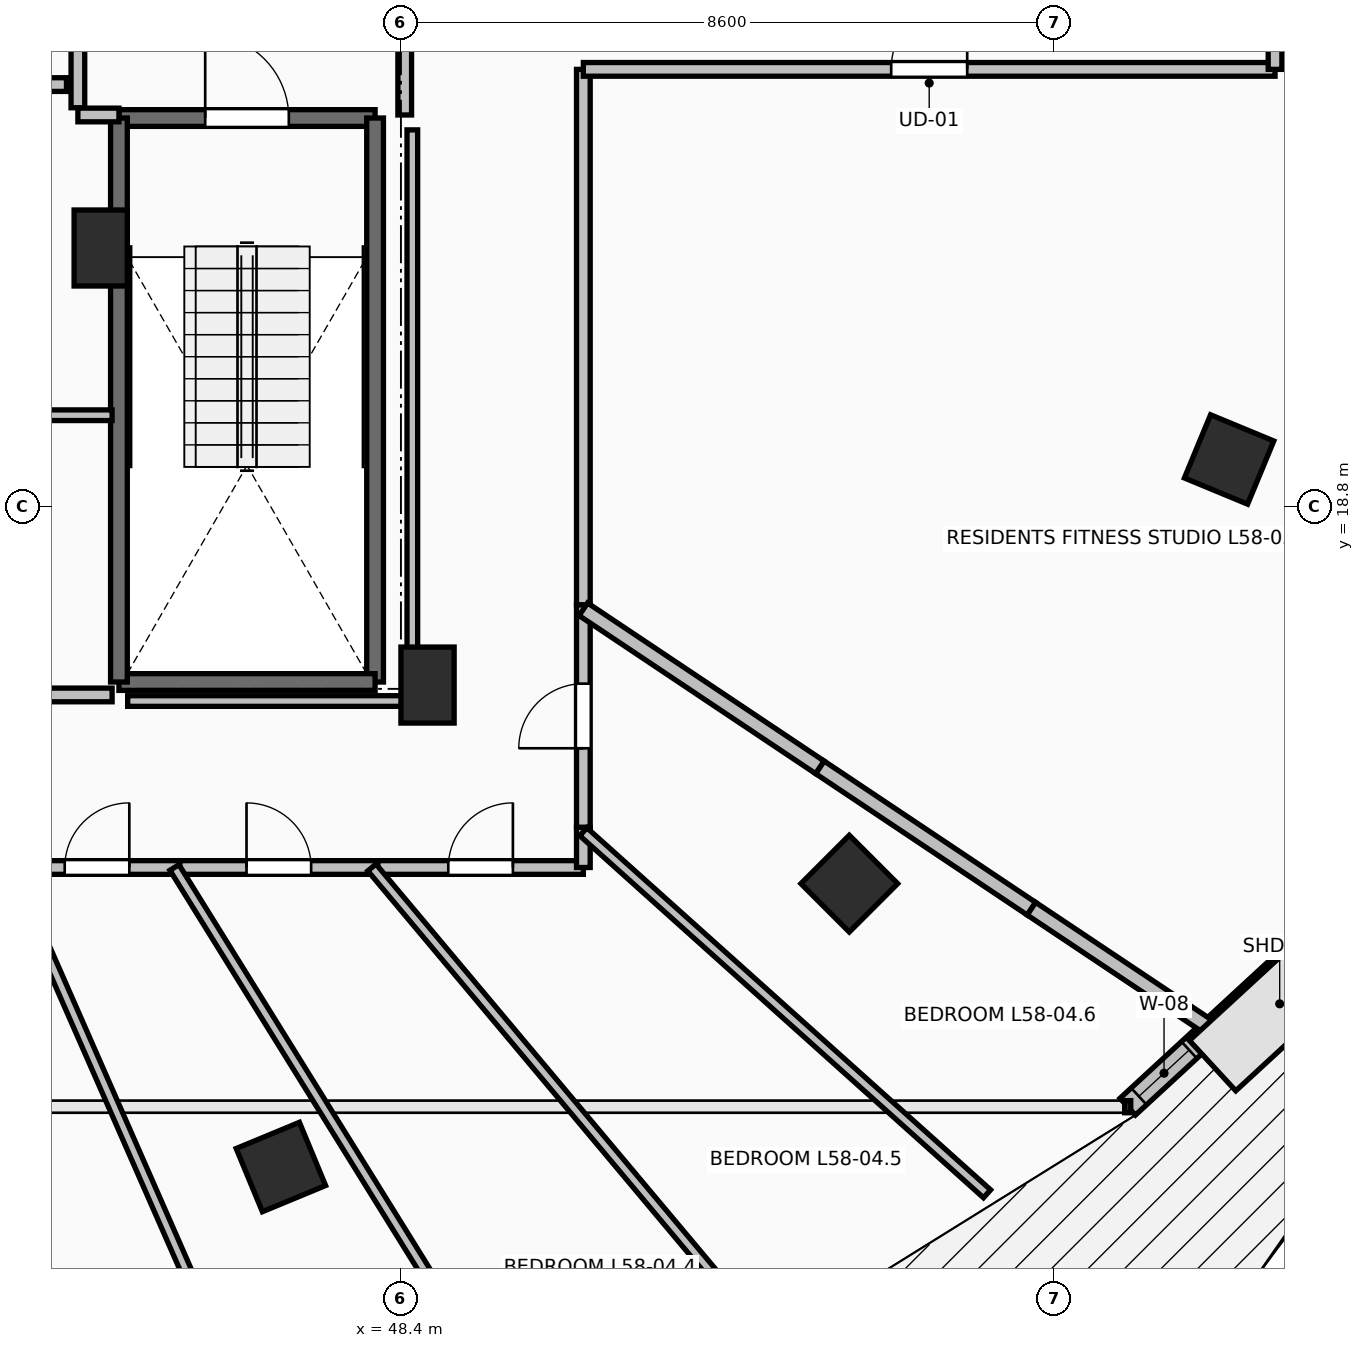
"""IFC4 building model, lengths in metres.
Left out: names, types, materials, properties, quantities, classifications, styles, units other than length and angle.
Written with IfcOpenShell. Run it as: python <this file> out.ifc"""

import sys

from ifc_helpers import new_model, si_unit, direction, frame, frame_2d, origin, origin_2d, place, context, subcontext, project, spatial, rectangle, extrude, element, fill, save


model = new_model("IFC4")
c1 = context("Model", 3, precision=1e-05, world=origin(), true_north=direction((0.0, 1.0)))
c2 = subcontext(c1, "Body", "Model", "MODEL_VIEW")
j1 = project(units=[si_unit("LENGTHUNIT", "METRE"), si_unit("PLANEANGLEUNIT", "RADIAN")], contexts=[c1])
p1 = place(None, origin())
s1 = spatial("IfcSite", under=j1, at=p1, CompositionType="ELEMENT")
p2 = place(p1, origin())
s2 = spatial("IfcBuilding", under=s1, at=p2, CompositionType="ELEMENT")
p3 = place(p2, frame((0.0, 0.0, 214.3)))
s3 = spatial("IfcBuildingStorey", under=s2, at=p3, CompositionType="ELEMENT", Elevation=214.3)
for number, where, z_axis, x_axis in (
    (1, (46.821, 10.109, 0.0), (0.0, 0.0, 1.0), (0.383, -0.924, 0.0)),
    (2, (54.299, 13.838, 0.0), (0.0, 0.0, 1.0), (0.707, -0.707, 0.0)),
    (3, (59.295, 19.418, 0.0), (0.0, 0.0, 1.0), (0.924, -0.383, 0.0)),
):
    element("IfcColumn", number, at=place(p3, frame(where, z_axis=z_axis, x_axis=x_axis)), inside=s3, PredefinedType="COLUMN", context=c2, shape_type="SweptSolid", body=[
        extrude(rectangle(XDim=0.9, YDim=0.9, at=origin_2d()), origin(), (0.0, 0.0, 1.0), 3.55),
    ])
for number, where, z_axis, x_axis in (
    (4, (48.75, 16.45, 0.0), (0.0, 0.0, 1.0), (1.0, 0.0, 0.0)),
    (5, (44.45, 22.2, 0.0), (0.0, 0.0, 1.0), (1.0, 0.0, 0.0)),
):
    element("IfcColumn", number, at=place(p3, frame(where, z_axis=z_axis, x_axis=x_axis)), inside=s3, PredefinedType="PILASTER", context=c2, shape_type="SweptSolid", body=[
        extrude(rectangle(XDim=0.7, YDim=1.0, at=origin_2d()), origin(), (0.0, 0.0, 1.0), 3.55),
    ])
p4 = place(p3, frame((57.962, 10.903, 0.0), z_axis=(0.0, 0.0, 1.0), x_axis=(0.735359993374, 0.677676678177, 0.0)))
e6 = element("IfcWall", 6, at=p4, inside=s3, PredefinedType="STANDARD", context=c2, shape_type="SweptSolid", body=[
    extrude(rectangle(XDim=4.774, YDim=0.3, at=frame_2d((2.387, 0.0))), origin(), (0.0, 0.0, 1.0), 3.29),
])
p5 = place(p4, frame((0.2, 0.0, 0.85)))
e7 = element("IfcOpeningElement", 7, at=p5, cuts=e6, PredefinedType="OPENING", context=c2, shape_type="SweptSolid", body=[
    extrude(rectangle(XDim=0.9, YDim=1.8, at=frame_2d((0.45, 0.9))), frame((0.0, 0.165, 0.0), z_axis=(0.0, -1.0, 0.0), x_axis=(1.0, 0.0, 0.0)), (0.0, 0.0, 1.0), 0.33),
])
p6 = place(p3, frame((44.69, 23.91, 0.0), z_axis=(0.0, 0.0, 1.0), x_axis=(1.0, 0.0, 0.0)))
e8 = element("IfcWall", 8, at=p6, inside=s3, PredefinedType="SOLIDWALL", context=c2, shape_type="SweptSolid", body=[
    extrude(rectangle(XDim=3.37, YDim=0.22, at=frame_2d((1.685, 0.0))), origin(), (0.0, 0.0, 1.0), 3.29),
])
p7 = place(p6, frame((1.135, 0.0, 0.0)))
e9 = element("IfcOpeningElement", 9, at=p7, cuts=e8, PredefinedType="OPENING", context=c2, shape_type="SweptSolid", body=[
    extrude(rectangle(XDim=1.1, YDim=2.15, at=frame_2d((0.55, 1.075))), frame((0.0, 0.125, 0.0), z_axis=(0.0, -1.0, 0.0), x_axis=(1.0, 0.0, 0.0)), (0.0, 0.0, 1.0), 0.25),
])
p8 = place(p3, frame((48.06, 23.91, 0.0), z_axis=(0.0, 0.0, 1.0), x_axis=(0.0, -1.0, 0.0)))
e10 = element("IfcWall", 10, at=p8, inside=s3, PredefinedType="SOLIDWALL", context=c2, shape_type="SweptSolid", body=[
    extrude(rectangle(XDim=7.42, YDim=0.22, at=frame_2d((3.71, 0.0))), origin(), (0.0, 0.0, 1.0), 3.29),
])
p9 = place(p3, frame((48.06, 16.49, 0.0), z_axis=(0.0, 0.0, 1.0), x_axis=(-1.0, 0.0, 0.0)))
e11 = element("IfcWall", 11, at=p9, inside=s3, PredefinedType="SOLIDWALL", context=c2, shape_type="SweptSolid", body=[
    extrude(rectangle(XDim=3.37, YDim=0.22, at=frame_2d((1.685, 0.0))), origin(), (0.0, 0.0, 1.0), 3.29),
])
p10 = place(p3, frame((44.69, 16.49, 0.0), z_axis=(0.0, 0.0, 1.0), x_axis=(0.0, 1.0, 0.0)))
e12 = element("IfcWall", 12, at=p10, inside=s3, PredefinedType="SOLIDWALL", context=c2, shape_type="SweptSolid", body=[
    extrude(rectangle(XDim=7.42, YDim=0.22, at=frame_2d((3.71, 0.0))), origin(), (0.0, 0.0, 1.0), 3.29),
])
p11 = place(p3, frame((44.15, 27.955, 0.0), z_axis=(0.0, 0.0, 1.0), x_axis=(0.0, -1.0, 0.0)))
e13 = element("IfcWall", 13, at=p11, inside=s3, PredefinedType="PARTITIONING", context=c2, shape_type="SweptSolid", body=[
    extrude(rectangle(XDim=3.91, YDim=0.18, at=frame_2d((1.955, 0.0))), origin(), (0.0, 0.0, 1.0), 3.29),
])
p12 = place(p11, frame((1.355, 0.0, 0.0)))
e14 = element("IfcOpeningElement", 14, at=p12, cuts=e13, PredefinedType="OPENING", context=c2, shape_type="SweptSolid", body=[
    extrude(rectangle(XDim=1.2, YDim=2.15, at=frame_2d((0.6, 1.075))), frame((0.0, 0.105, 0.0), z_axis=(0.0, -1.0, 0.0), x_axis=(1.0, 0.0, 0.0)), (0.0, 0.0, 1.0), 0.21),
])
p13 = place(p3, frame((44.15, 23.95, 0.0), z_axis=(0.0, 0.0, 1.0), x_axis=(1.0, 0.0, 0.0)))
e15 = element("IfcWall", 15, at=p13, inside=s3, PredefinedType="PARTITIONING", context=c2, shape_type="SweptSolid", body=[
    extrude(rectangle(XDim=0.54, YDim=0.18, at=frame_2d((0.27, 0.0))), origin(), (0.0, 0.0, 1.0), 3.29),
])
p14 = place(p3, frame((48.45, 23.95, 0.0), z_axis=(0.0, 0.0, 1.0), x_axis=(0.0, 1.0, 0.0)))
e16 = element("IfcWall", 16, at=p14, inside=s3, PredefinedType="PARTITIONING", context=c2, shape_type="SweptSolid", body=[
    extrude(rectangle(XDim=4.05, YDim=0.18, at=frame_2d((2.025, 0.0))), origin(), (0.0, 0.0, 1.0), 3.29),
])
p15 = place(p14, frame((1.425, 0.0, 0.0)))
e17 = element("IfcOpeningElement", 17, at=p15, cuts=e16, PredefinedType="OPENING", context=c2, shape_type="SweptSolid", body=[
    extrude(rectangle(XDim=1.2, YDim=2.15, at=frame_2d((0.6, 1.075))), frame((0.0, 0.105, 0.0), z_axis=(0.0, -1.0, 0.0), x_axis=(1.0, 0.0, 0.0)), (0.0, 0.0, 1.0), 0.21),
])
p16 = place(p3, frame((41.555, 24.35, 0.0), z_axis=(0.0, 0.0, 1.0), x_axis=(1.0, 0.0, 0.0)))
e18 = element("IfcWall", 18, at=p16, inside=s3, PredefinedType="PARTITIONING", context=c2, shape_type="SweptSolid", body=[
    extrude(rectangle(XDim=2.445, YDim=0.18, at=frame_2d((1.223, 0.0))), origin(), (0.0, 0.0, 1.0), 3.29),
])
p17 = place(p16, frame((0.722, 0.0, 0.0)))
e19 = element("IfcOpeningElement", 19, at=p17, cuts=e18, PredefinedType="OPENING", context=c2, shape_type="SweptSolid", body=[
    extrude(rectangle(XDim=1.0, YDim=2.15, at=frame_2d((0.5, 1.075))), frame((0.0, 0.105, 0.0), z_axis=(0.0, -1.0, 0.0), x_axis=(1.0, 0.0, 0.0)), (0.0, 0.0, 1.0), 0.21),
])
p18 = place(p3, frame((44.6, 20.0, 0.0), z_axis=(0.0, 0.0, 1.0), x_axis=(-1.0, 0.0, 0.0)))
e20 = element("IfcWall", 20, at=p18, inside=s3, PredefinedType="PARTITIONING", context=c2, shape_type="SweptSolid", body=[
    extrude(rectangle(XDim=3.2, YDim=0.14, at=frame_2d((1.6, 0.0))), origin(), (0.0, 0.0, 1.0), 3.29),
])
p19 = place(p3, frame((41.4, 16.32, 0.0), z_axis=(0.0, 0.0, 1.0), x_axis=(1.0, 0.0, 0.0)))
e21 = element("IfcWall", 21, at=p19, inside=s3, PredefinedType="PARTITIONING", context=c2, shape_type="SweptSolid", body=[
    extrude(rectangle(XDim=3.2, YDim=0.18, at=frame_2d((1.6, 0.0))), origin(), (0.0, 0.0, 1.0), 3.29),
])
p20 = place(p19, frame((1.2, 0.0, 0.0)))
e22 = element("IfcOpeningElement", 22, at=p20, cuts=e21, PredefinedType="OPENING", context=c2, shape_type="SweptSolid", body=[
    extrude(rectangle(XDim=0.8, YDim=2.05, at=frame_2d((0.4, 1.025))), frame((0.0, 0.105, 0.0), z_axis=(0.0, -1.0, 0.0), x_axis=(1.0, 0.0, 0.0)), (0.0, 0.0, 1.0), 0.21),
])
p21 = place(p3, frame((43.312, 14.05, 0.0), z_axis=(0.0, 0.0, 1.0), x_axis=(1.0, 0.0, 0.0)))
e23 = element("IfcWall", 23, at=p21, inside=s3, PredefinedType="PARTITIONING", context=c2, shape_type="SweptSolid", body=[
    extrude(rectangle(XDim=2.179, YDim=0.18, at=frame_2d((1.089, 0.0))), origin(), (0.0, 0.0, 1.0), 2.482),
])
p22 = place(p21, frame((0.665, 0.0, 0.0)))
e24 = element("IfcOpeningElement", 24, at=p22, cuts=e23, PredefinedType="OPENING", context=c2, shape_type="SweptSolid", body=[
    extrude(rectangle(XDim=0.85, YDim=2.1, at=frame_2d((0.425, 1.05))), frame((0.0, 0.105, 0.0), z_axis=(0.0, -1.0, 0.0), x_axis=(1.0, 0.0, 0.0)), (0.0, 0.0, 1.0), 0.21),
])
p23 = place(p3, frame((45.491, 14.05, 0.0), z_axis=(0.0, 0.0, 1.0), x_axis=(1.0, 0.0, 0.0)))
e25 = element("IfcWall", 25, at=p23, inside=s3, PredefinedType="PARTITIONING", context=c2, shape_type="SweptSolid", body=[
    extrude(rectangle(XDim=2.605, YDim=0.18, at=frame_2d((1.302, 0.0))), origin(), (0.0, 0.0, 1.0), 2.482),
])
p24 = place(p23, frame((0.877, 0.0, 0.0)))
e26 = element("IfcOpeningElement", 26, at=p24, cuts=e25, PredefinedType="OPENING", context=c2, shape_type="SweptSolid", body=[
    extrude(rectangle(XDim=0.85, YDim=2.1, at=frame_2d((0.425, 1.05))), frame((0.0, 0.105, 0.0), z_axis=(0.0, -1.0, 0.0), x_axis=(1.0, 0.0, 0.0)), (0.0, 0.0, 1.0), 0.21),
])
p25 = place(p3, frame((48.096, 14.05, 0.0), z_axis=(0.0, 0.0, 1.0), x_axis=(1.0, 0.0, 0.0)))
e27 = element("IfcWall", 27, at=p25, inside=s3, PredefinedType="PARTITIONING", context=c2, shape_type="SweptSolid", body=[
    extrude(rectangle(XDim=2.704, YDim=0.18, at=frame_2d((1.352, 0.0))), origin(), (0.0, 0.0, 1.0), 2.482),
])
p26 = place(p25, frame((0.927, 0.0, 0.0)))
e28 = element("IfcOpeningElement", 28, at=p26, cuts=e27, PredefinedType="OPENING", context=c2, shape_type="SweptSolid", body=[
    extrude(rectangle(XDim=0.85, YDim=2.1, at=frame_2d((0.425, 1.05))), frame((0.0, 0.105, 0.0), z_axis=(0.0, -1.0, 0.0), x_axis=(1.0, 0.0, 0.0)), (0.0, 0.0, 1.0), 0.21),
])
p27 = place(p3, frame((50.8, 14.05, 0.0), z_axis=(0.0, 0.0, 1.0), x_axis=(0.0, 1.0, 0.0)))
e29 = element("IfcWall", 29, at=p27, inside=s3, PredefinedType="PARTITIONING", context=c2, shape_type="SweptSolid", body=[
    extrude(rectangle(XDim=0.53, YDim=0.18, at=frame_2d((0.265, 0.0))), origin(), (0.0, 0.0, 1.0), 2.936),
])
p28 = place(p3, frame((50.8, 14.58, 0.0), z_axis=(0.0, 0.0, 1.0), x_axis=(0.0, 1.0, 0.0)))
e30 = element("IfcWall", 30, at=p28, inside=s3, PredefinedType="PARTITIONING", context=c2, shape_type="SweptSolid", body=[
    extrude(rectangle(XDim=2.927, YDim=0.18, at=frame_2d((1.463, 0.0))), origin(), (0.0, 0.0, 1.0), 2.482),
])
p29 = place(p28, frame((1.039, 0.0, 0.0)))
e31 = element("IfcOpeningElement", 31, at=p29, cuts=e30, PredefinedType="OPENING", context=c2, shape_type="SweptSolid", body=[
    extrude(rectangle(XDim=0.85, YDim=2.1, at=frame_2d((0.425, 1.05))), frame((0.0, 0.105, 0.0), z_axis=(0.0, -1.0, 0.0), x_axis=(1.0, 0.0, 0.0)), (0.0, 0.0, 1.0), 0.21),
])
p30 = place(p3, frame((50.8, 17.507, 0.0), z_axis=(0.0, 0.0, 1.0), x_axis=(0.0, 1.0, 0.0)))
e32 = element("IfcWall", 32, at=p30, inside=s3, PredefinedType="PARTITIONING", context=c2, shape_type="SweptSolid", body=[
    extrude(rectangle(XDim=7.043, YDim=0.18, at=frame_2d((3.521, 0.0))), origin(), (0.0, 0.0, 1.0), 2.979),
])
p31 = place(p3, frame((50.8, 24.55, 0.0), z_axis=(0.0, 0.0, 1.0), x_axis=(1.0, 0.0, 0.0)))
e33 = element("IfcWall", 33, at=p31, inside=s3, PredefinedType="PARTITIONING", context=c2, shape_type="SweptSolid", body=[
    extrude(rectangle(XDim=9.1, YDim=0.18, at=frame_2d((4.55, 0.0))), origin(), (0.0, 0.0, 1.0), 2.482),
])
p32 = place(p31, frame((4.05, 0.0, 0.0)))
e34 = element("IfcOpeningElement", 34, at=p32, cuts=e33, PredefinedType="OPENING", context=c2, shape_type="SweptSolid", body=[
    extrude(rectangle(XDim=1.0, YDim=2.15, at=frame_2d((0.5, 1.075))), frame((0.0, 0.105, 0.0), z_axis=(0.0, -1.0, 0.0), x_axis=(1.0, 0.0, 0.0)), (0.0, 0.0, 1.0), 0.21),
])
p33 = place(p3, frame((59.9, 24.55, 0.0), z_axis=(0.0, 0.0, 1.0), x_axis=(0.0, 1.0, 0.0)))
e35 = element("IfcWall", 35, at=p33, inside=s3, PredefinedType="PARTITIONING", context=c2, shape_type="SweptSolid", body=[
    extrude(rectangle(XDim=2.7, YDim=0.18, at=frame_2d((1.35, 0.0))), origin(), (0.0, 0.0, 1.0), 2.482),
])
p34 = place(p3, frame((43.812, 5.131, 0.0), z_axis=(0.0, 0.0, 1.0), x_axis=(-0.268310216589, 0.963332563383, 0.0)))
e36 = element("IfcWall", 36, at=p34, inside=s3, PredefinedType="PARTITIONING", context=c2, shape_type="SweptSolid", body=[
    extrude(rectangle(XDim=9.259, YDim=0.14, at=frame_2d((4.629, 0.0))), origin(), (0.0, 0.0, 1.0), 2.482),
])
p35 = place(p34, frame((4.204, 0.0, 0.0)))
e37 = element("IfcOpeningElement", 37, at=p35, cuts=e36, PredefinedType="OPENING", context=c2, shape_type="SweptSolid", body=[
    extrude(rectangle(XDim=0.85, YDim=2.1, at=frame_2d((0.425, 1.05))), frame((0.0, 0.085, 0.0), z_axis=(0.0, -1.0, 0.0), x_axis=(1.0, 0.0, 0.0)), (0.0, 0.0, 1.0), 0.17),
])
p36 = place(p3, frame((46.854, 5.829, 0.0), z_axis=(0.0, 0.0, 1.0), x_axis=(-0.401869944724, 0.915696755224, 0.0)))
e38 = element("IfcWall", 38, at=p36, inside=s3, PredefinedType="PARTITIONING", context=c2, shape_type="SweptSolid", body=[
    extrude(rectangle(XDim=8.978, YDim=0.14, at=frame_2d((4.489, 0.0))), origin(), (0.0, 0.0, 1.0), 2.482),
])
p37 = place(p3, frame((49.957, 6.743, 0.0), z_axis=(0.0, 0.0, 1.0), x_axis=(-0.527501342892, 0.849554196769, 0.0)))
e39 = element("IfcWall", 39, at=p37, inside=s3, PredefinedType="PARTITIONING", context=c2, shape_type="SweptSolid", body=[
    extrude(rectangle(XDim=8.601, YDim=0.14, at=frame_2d((4.301, 0.0))), origin(), (0.0, 0.0, 1.0), 2.482),
])
p38 = place(p3, frame((53.083, 8.009, 0.0), z_axis=(0.0, 0.0, 1.0), x_axis=(-0.642484403916, 0.766298760749, 0.0)))
e40 = element("IfcWall", 40, at=p38, inside=s3, PredefinedType="PARTITIONING", context=c2, shape_type="SweptSolid", body=[
    extrude(rectangle(XDim=7.883, YDim=0.14, at=frame_2d((3.942, 0.0))), origin(), (0.0, 0.0, 1.0), 2.482),
])
p39 = place(p3, frame((56.111, 9.757, 0.0), z_axis=(0.0, 0.0, 1.0), x_axis=(-0.744477346253, 0.667647722168, 0.0)))
e41 = element("IfcWall", 41, at=p39, inside=s3, PredefinedType="PARTITIONING", context=c2, shape_type="SweptSolid", body=[
    extrude(rectangle(XDim=7.134, YDim=0.14, at=frame_2d((3.567, 0.0))), origin(), (0.0, 0.0, 1.0), 2.824),
])
p40 = place(p3, frame((56.695, 13.508, 0.0), z_axis=(0.0, 0.0, 1.0), x_axis=(-0.831533913479, 0.55547398745, 0.0)))
e42 = element("IfcWall", 42, at=p40, inside=s3, PredefinedType="PARTITIONING", context=c2, shape_type="SweptSolid", body=[
    extrude(rectangle(XDim=3.348, YDim=0.2, at=frame_2d((1.674, 0.0))), origin(), (0.0, 0.0, 1.0), 2.824),
])
p41 = place(p3, frame((53.911, 15.368, 0.0), z_axis=(0.0, 0.0, 1.0), x_axis=(-0.83140728108, 0.55566350696, 0.0)))
e43 = element("IfcWall", 43, at=p41, inside=s3, PredefinedType="PARTITIONING", context=c2, shape_type="SweptSolid", body=[
    extrude(rectangle(XDim=3.742, YDim=0.2, at=frame_2d((1.871, 0.0))), origin(), (0.0, 0.0, 1.0), 2.936),
])
p42 = place(p3, frame((59.067, 11.924, 0.0), z_axis=(0.0, 0.0, 1.0), x_axis=(-0.831602270354, 0.555371644885, 0.0)))
e44 = element("IfcWall", 44, at=p42, inside=s3, PredefinedType="PARTITIONING", context=c2, shape_type="SweptSolid", body=[
    extrude(rectangle(XDim=2.852, YDim=0.2, at=frame_2d((1.426, 0.0))), origin(), (0.0, 0.0, 1.0), 3.29),
])
p43 = place(p3, frame((44.805, 16.24, 0.0), z_axis=(0.0, 0.0, 1.0), x_axis=(1.0, 0.0, 0.0)))
e45 = element("IfcWall", 45, at=p43, inside=s3, PredefinedType="PARTITIONING", context=c2, shape_type="SweptSolid", body=[
    extrude(rectangle(XDim=3.745, YDim=0.14, at=frame_2d((1.873, 0.0))), origin(), (0.0, 0.0, 1.0), 2.482),
])
p44 = place(p3, frame((48.55, 16.24, 0.0), z_axis=(0.0, 0.0, 1.0), x_axis=(0.0, 1.0, 0.0)))
e46 = element("IfcWall", 46, at=p44, inside=s3, PredefinedType="PARTITIONING", context=c2, shape_type="SweptSolid", body=[
    extrude(rectangle(XDim=7.514, YDim=0.14, at=frame_2d((3.757, 0.0))), origin(), (0.0, 0.0, 1.0), 2.482),
])
p45 = place(p5, origin())
e47 = element("IfcWindow", 47, at=p45, inside=s3, PartitioningType="SINGLE_PANEL", PredefinedType="WINDOW", context=c2, shape_type="SweptSolid", body=[
    extrude(rectangle(XDim=0.9, YDim=1.8, at=frame_2d((0.45, 0.9))), frame((0.0, 0.03, 0.0), z_axis=(0.0, -1.0, 0.0), x_axis=(1.0, 0.0, 0.0)), (0.0, 0.0, 1.0), 0.06),
])
fill(e7, e47)
p46 = place(p7, origin())
e48 = element("IfcDoor", 48, at=p46, inside=s3, OperationType="SINGLE_SWING_LEFT", PredefinedType="DOOR", context=c2, shape_type="SweptSolid", body=[
    extrude(rectangle(XDim=1.1, YDim=2.15, at=frame_2d((0.55, 1.075))), frame((0.0, 0.025, 0.0), z_axis=(0.0, -1.0, 0.0), x_axis=(1.0, 0.0, 0.0)), (0.0, 0.0, 1.0), 0.05),
])
fill(e9, e48)
p47 = place(p32, origin())
e49 = element("IfcDoor", 49, at=p47, inside=s3, OperationType="SINGLE_SWING_RIGHT", PredefinedType="DOOR", context=c2, shape_type="SweptSolid", body=[
    extrude(rectangle(XDim=1.0, YDim=2.15, at=frame_2d((0.5, 1.075))), frame((0.0, 0.025, 0.0), z_axis=(0.0, -1.0, 0.0), x_axis=(1.0, 0.0, 0.0)), (0.0, 0.0, 1.0), 0.05),
])
fill(e34, e49)
p48 = place(p22, origin())
e50 = element("IfcDoor", 50, at=p48, inside=s3, OperationType="SINGLE_SWING_RIGHT", PredefinedType="DOOR", context=c2, shape_type="SweptSolid", body=[
    extrude(rectangle(XDim=0.85, YDim=2.1, at=frame_2d((0.425, 1.05))), frame((0.0, 0.025, 0.0), z_axis=(0.0, -1.0, 0.0), x_axis=(1.0, 0.0, 0.0)), (0.0, 0.0, 1.0), 0.05),
])
fill(e24, e50)
p49 = place(p24, origin())
e51 = element("IfcDoor", 51, at=p49, inside=s3, OperationType="SINGLE_SWING_LEFT", PredefinedType="DOOR", context=c2, shape_type="SweptSolid", body=[
    extrude(rectangle(XDim=0.85, YDim=2.1, at=frame_2d((0.425, 1.05))), frame((0.0, 0.025, 0.0), z_axis=(0.0, -1.0, 0.0), x_axis=(1.0, 0.0, 0.0)), (0.0, 0.0, 1.0), 0.05),
])
fill(e26, e51)
p50 = place(p26, origin())
e52 = element("IfcDoor", 52, at=p50, inside=s3, OperationType="SINGLE_SWING_RIGHT", PredefinedType="DOOR", context=c2, shape_type="SweptSolid", body=[
    extrude(rectangle(XDim=0.85, YDim=2.1, at=frame_2d((0.425, 1.05))), frame((0.0, 0.025, 0.0), z_axis=(0.0, -1.0, 0.0), x_axis=(1.0, 0.0, 0.0)), (0.0, 0.0, 1.0), 0.05),
])
fill(e28, e52)
p51 = place(p29, origin())
e53 = element("IfcDoor", 53, at=p51, inside=s3, OperationType="SINGLE_SWING_LEFT", PredefinedType="DOOR", context=c2, shape_type="SweptSolid", body=[
    extrude(rectangle(XDim=0.85, YDim=2.1, at=frame_2d((0.425, 1.05))), frame((0.0, 0.025, 0.0), z_axis=(0.0, -1.0, 0.0), x_axis=(1.0, 0.0, 0.0)), (0.0, 0.0, 1.0), 0.05),
])
fill(e31, e53)
save(model, sys.argv[1])
